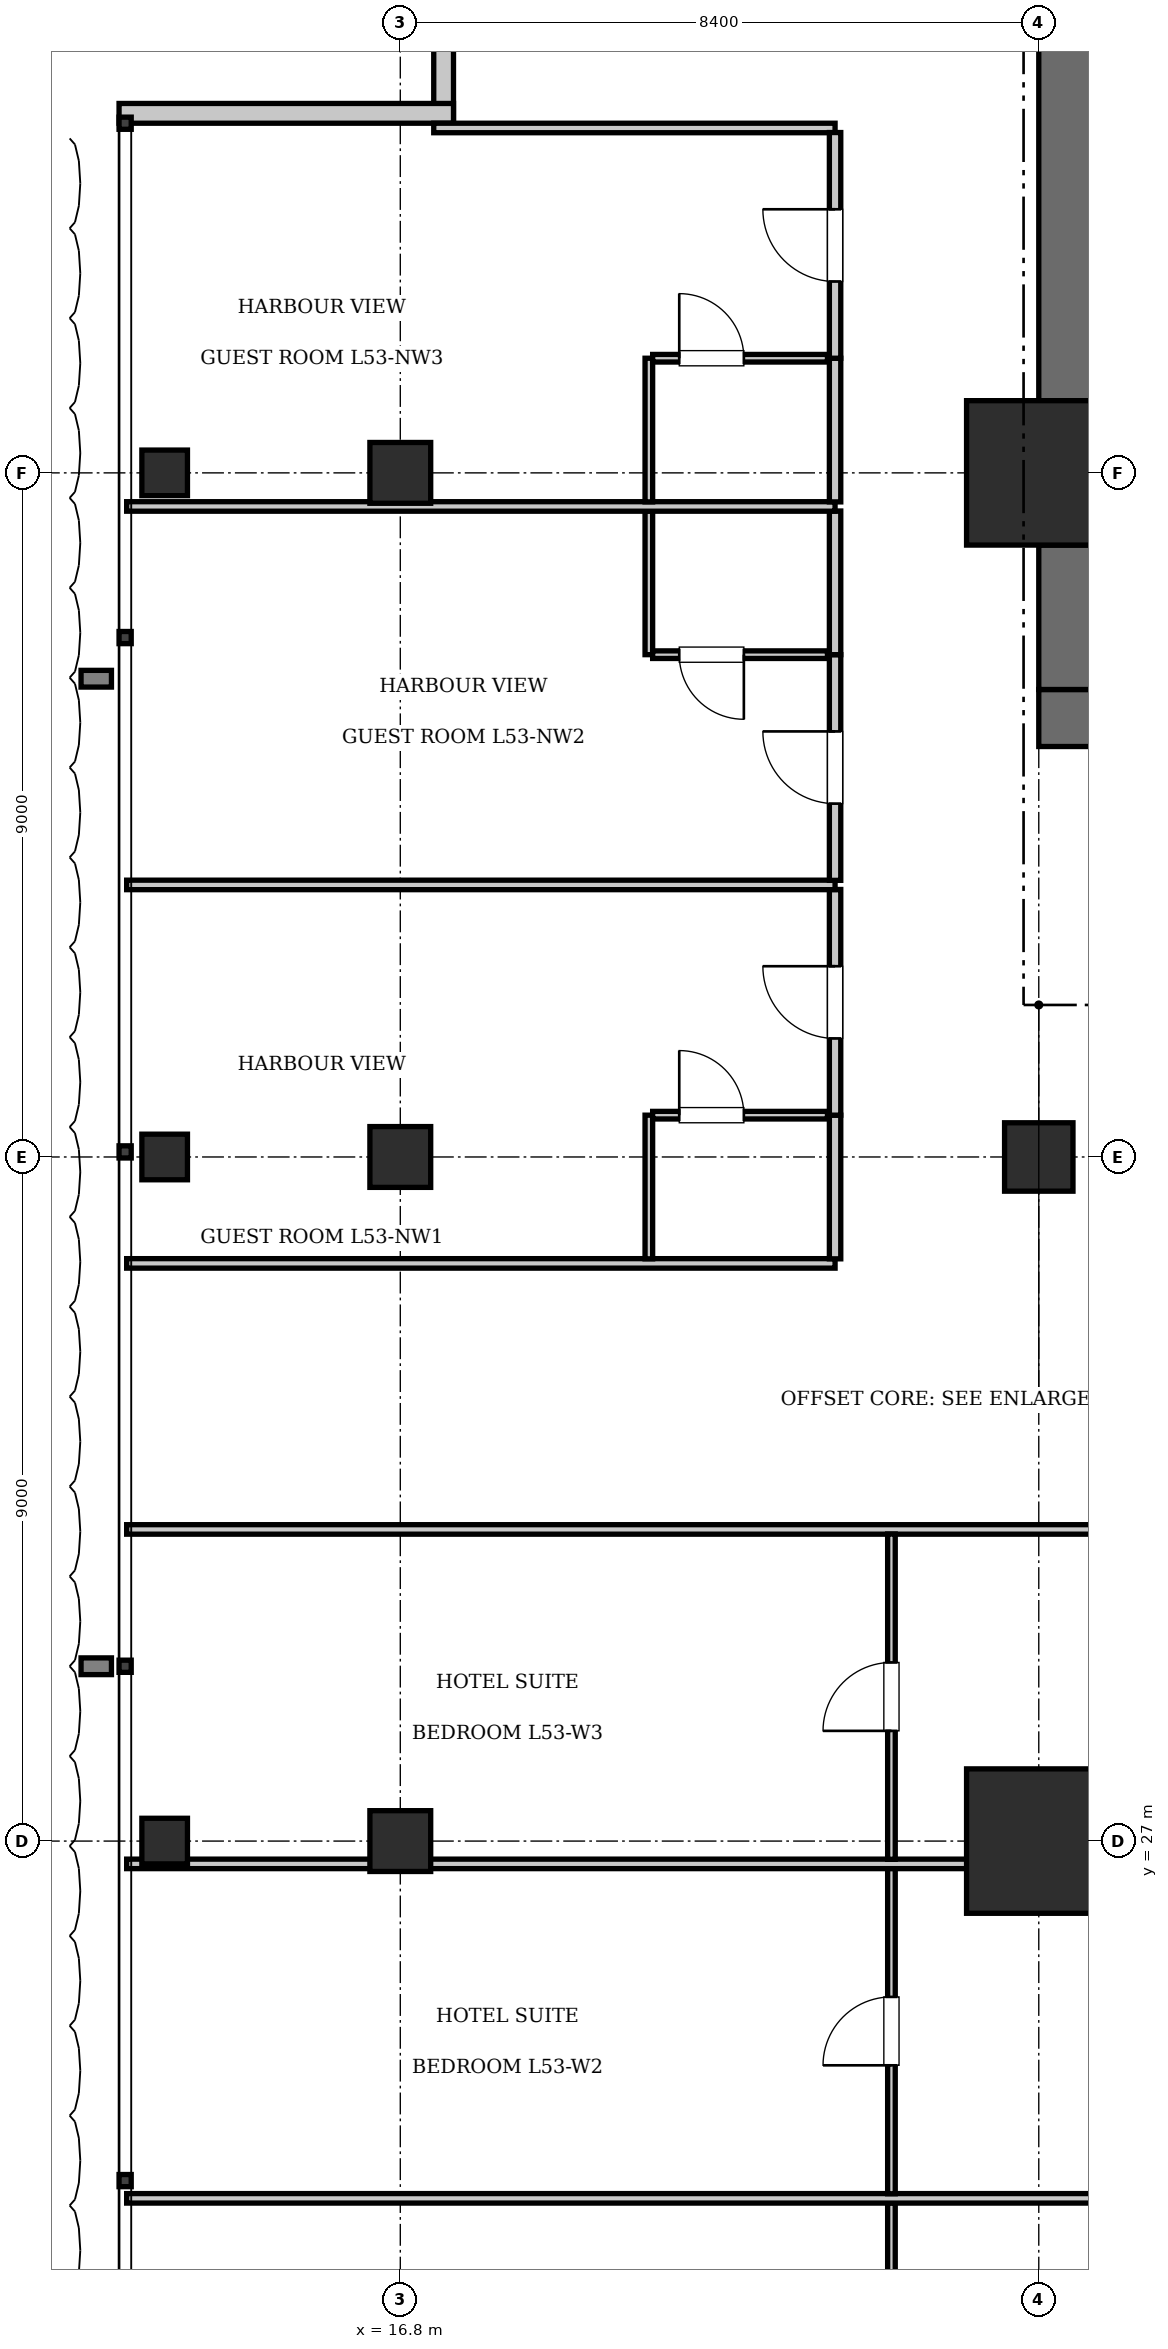
"""IFC4 building model, lengths in metres.
Left out: names, types, materials, properties, quantities, classifications, styles, units other than length and angle.
Written with IfcOpenShell. Run it as: python <this file> out.ifc"""

import sys

from ifc_helpers import new_model, si_unit, direction, frame, frame_2d, origin, origin_2d, place, context, subcontext, project, spatial, rectangle, i_section, extrude, element, fill, save


model = new_model("IFC4")
c1 = context("Model", 3, precision=1e-05, world=origin(), true_north=direction((0.0, 1.0)))
c2 = subcontext(c1, "Body", "Model", "MODEL_VIEW")
j1 = project(units=[si_unit("LENGTHUNIT", "METRE"), si_unit("PLANEANGLEUNIT", "RADIAN")], contexts=[c1])
p1 = place(None, origin())
s1 = spatial("IfcSite", under=j1, at=p1, CompositionType="ELEMENT")
p2 = place(p1, origin())
s2 = spatial("IfcBuilding", under=s1, at=p2, CompositionType="ELEMENT")
p3 = place(p2, frame((0.0, 0.0, 215.95)))
s3 = spatial("IfcBuildingStorey", under=s2, at=p3, CompositionType="ELEMENT", Elevation=215.95)
for number, where, z_axis, x_axis in (
    (1, (25.2, 27.0, 0.0), (0.0, 0.0, 1.0), (1.0, 0.0, 0.0)),
    (2, (25.2, 45.0, 0.0), (0.0, 0.0, 1.0), (1.0, 0.0, 0.0)),
):
    element("IfcColumn", number, at=place(p3, frame(where, z_axis=z_axis, x_axis=x_axis)), inside=s3, PredefinedType="COLUMN", context=c2, shape_type="SweptSolid", body=[
        extrude(rectangle(XDim=1.9, YDim=1.9, at=origin_2d()), origin(), (0.0, 0.0, 1.0), 3.85),
    ])
p4 = place(p3, frame((25.2, 41.775, 0.0), z_axis=(0.0, 0.0, 1.0), x_axis=(1.0, 0.0, 0.0)))
e3 = element("IfcWall", 3, at=p4, inside=s3, PredefinedType="SHEAR", context=c2, shape_type="SweptSolid", body=[
    extrude(rectangle(XDim=6.8, YDim=0.75, at=frame_2d((3.4, 0.0))), origin(), (0.0, 0.0, 1.0), 3.85),
])
p5 = place(p4, frame((1.65, 0.0, 0.0)))
e4 = element("IfcOpeningElement", 4, at=p5, cuts=e3, PredefinedType="OPENING", context=c2, shape_type="SweptSolid", body=[
    extrude(rectangle(XDim=1.15, YDim=2.15, at=frame_2d((0.575, 1.075))), frame((0.0, 0.385, 0.0), z_axis=(0.0, -1.0, 0.0), x_axis=(1.0, 0.0, 0.0)), (0.0, 0.0, 1.0), 0.77),
])
p6 = place(p4, frame((5.15, 0.0, 0.0)))
e5 = element("IfcOpeningElement", 5, at=p6, cuts=e3, PredefinedType="OPENING", context=c2, shape_type="SweptSolid", body=[
    extrude(rectangle(XDim=1.1, YDim=2.2, at=frame_2d((0.55, 1.1))), frame((0.0, 0.385, 0.0), z_axis=(0.0, -1.0, 0.0), x_axis=(1.0, 0.0, 0.0)), (0.0, 0.0, 1.0), 0.77),
])
p7 = place(p3, frame((25.575, 42.15, 0.0), z_axis=(0.0, 0.0, 1.0), x_axis=(0.0, 1.0, 0.0)))
e6 = element("IfcWall", 6, at=p7, inside=s3, PredefinedType="SHEAR", context=c2, shape_type="SweptSolid", body=[
    extrude(rectangle(XDim=1.9, YDim=0.75, at=frame_2d((0.95, 0.0))), origin(), (0.0, 0.0, 1.0), 3.85),
])
p8 = place(p3, frame((25.575, 45.95, 0.0), z_axis=(0.0, 0.0, 1.0), x_axis=(0.0, 1.0, 0.0)))
e7 = element("IfcWall", 7, at=p8, inside=s3, PredefinedType="SHEAR", context=c2, shape_type="SweptSolid", body=[
    extrude(rectangle(XDim=7.3, YDim=0.75, at=frame_2d((3.65, 0.0))), origin(), (0.0, 0.0, 1.0), 3.85),
])
p9 = place(p3, frame((25.2, 36.0, 0.0), z_axis=(0.0, 0.0, 1.0), x_axis=(1.0, 0.0, 0.0)))
e8 = element("IfcColumn", 8, at=p9, inside=s3, PredefinedType="COLUMN", context=c2, shape_type="SweptSolid", body=[
    extrude(rectangle(XDim=0.9, YDim=0.9, at=origin_2d()), origin(), (0.0, 0.0, 1.0), 3.85),
])
for number, where, z_axis, x_axis in (
    (9, (16.8, 27.0, 0.0), (0.0, 0.0, 1.0), (1.0, 0.0, 0.0)),
    (10, (16.8, 36.0, 0.0), (0.0, 0.0, 1.0), (1.0, 0.0, 0.0)),
    (11, (16.8, 45.0, 0.0), (0.0, 0.0, 1.0), (1.0, 0.0, 0.0)),
):
    element("IfcColumn", number, at=place(p3, frame(where, z_axis=z_axis, x_axis=x_axis)), inside=s3, PredefinedType="COLUMN", context=c2, shape_type="SweptSolid", body=[
        extrude(rectangle(XDim=0.8, YDim=0.8, at=origin_2d()), origin(), (0.0, 0.0, 1.0), 3.85),
    ])
for number, where, z_axis, x_axis in (
    (12, (13.7, 27.0, 0.0), (0.0, 0.0, 1.0), (1.0, 0.0, 0.0)),
    (13, (13.7, 36.0, 0.0), (0.0, 0.0, 1.0), (1.0, 0.0, 0.0)),
    (14, (13.7, 45.0, 0.0), (0.0, 0.0, 1.0), (1.0, 0.0, 0.0)),
):
    element("IfcColumn", number, at=place(p3, frame(where, z_axis=z_axis, x_axis=x_axis)), inside=s3, PredefinedType="COLUMN", context=c2, shape_type="SweptSolid", body=[
        extrude(i_section(OverallWidth=0.6, OverallDepth=0.6, WebThickness=0.025, FlangeThickness=0.038, at=origin_2d()), origin(), (0.0, 0.0, 1.0), 3.85),
    ])
for number, where, z_axis, x_axis in (
    (15, (17.37, 49.6, 0.0), (0.0, 0.0, 1.0), (0.0, 1.0, 0.0)),
    (16, (13.1, 49.73, 0.0), (0.0, 0.0, 1.0), (1.0, 0.0, 0.0)),
):
    element("IfcWall", number, at=place(p3, frame(where, z_axis=z_axis, x_axis=x_axis)), inside=s3, PredefinedType="SOLIDWALL", context=c2, shape_type="SweptSolid", body=[
        extrude(rectangle(XDim=4.4, YDim=0.26, at=frame_2d((2.2, 0.0))), origin(), (0.0, 0.0, 1.0), 3.61),
    ])
p10 = place(p3, frame((13.2, 31.1, 0.0), z_axis=(0.0, 0.0, 1.0), x_axis=(1.0, 0.0, 0.0)))
e17 = element("IfcWall", 17, at=p10, inside=s3, PredefinedType="PARTITIONING", context=c2, shape_type="SweptSolid", body=[
    extrude(rectangle(XDim=23.52, YDim=0.125, at=frame_2d((11.76, 0.0))), origin(), (0.0, 0.0, 1.0), 3.61),
])
p11 = place(p3, frame((23.262, 17.96, 0.0), z_axis=(0.0, 0.0, 1.0), x_axis=(0.0, 1.0, 0.0)))
e18 = element("IfcWall", 18, at=p11, inside=s3, PredefinedType="PARTITIONING", context=c2, shape_type="SweptSolid", body=[
    extrude(rectangle(XDim=4.28, YDim=0.1, at=frame_2d((2.14, 0.0))), origin(), (0.0, 0.0, 1.0), 3.61),
])
p12 = place(p11, frame((1.69, 0.0, 0.0)))
e19 = element("IfcOpeningElement", 19, at=p12, cuts=e18, PredefinedType="OPENING", context=c2, shape_type="SweptSolid", body=[
    extrude(rectangle(XDim=0.9, YDim=2.1, at=frame_2d((0.45, 1.05))), frame((0.0, 0.06, 0.0), z_axis=(0.0, -1.0, 0.0), x_axis=(1.0, 0.0, 0.0)), (0.0, 0.0, 1.0), 0.12),
])
p13 = place(p3, frame((13.2, 22.3, 0.0), z_axis=(0.0, 0.0, 1.0), x_axis=(1.0, 0.0, 0.0)))
e20 = element("IfcWall", 20, at=p13, inside=s3, PredefinedType="PARTITIONING", context=c2, shape_type="SweptSolid", body=[
    extrude(rectangle(XDim=23.52, YDim=0.125, at=frame_2d((11.76, 0.0))), origin(), (0.0, 0.0, 1.0), 3.61),
])
p14 = place(p3, frame((23.262, 22.36, 0.0), z_axis=(0.0, 0.0, 1.0), x_axis=(0.0, 1.0, 0.0)))
e21 = element("IfcWall", 21, at=p14, inside=s3, PredefinedType="PARTITIONING", context=c2, shape_type="SweptSolid", body=[
    extrude(rectangle(XDim=4.28, YDim=0.1, at=frame_2d((2.14, 0.0))), origin(), (0.0, 0.0, 1.0), 3.61),
])
p15 = place(p14, frame((1.69, 0.0, 0.0)))
e22 = element("IfcOpeningElement", 22, at=p15, cuts=e21, PredefinedType="OPENING", context=c2, shape_type="SweptSolid", body=[
    extrude(rectangle(XDim=0.9, YDim=2.1, at=frame_2d((0.45, 1.05))), frame((0.0, 0.06, 0.0), z_axis=(0.0, -1.0, 0.0), x_axis=(1.0, 0.0, 0.0)), (0.0, 0.0, 1.0), 0.12),
])
p16 = place(p3, frame((13.2, 26.7, 0.0), z_axis=(0.0, 0.0, 1.0), x_axis=(1.0, 0.0, 0.0)))
e23 = element("IfcWall", 23, at=p16, inside=s3, PredefinedType="PARTITIONING", context=c2, shape_type="SweptSolid", body=[
    extrude(rectangle(XDim=23.52, YDim=0.125, at=frame_2d((11.76, 0.0))), origin(), (0.0, 0.0, 1.0), 3.61),
])
p17 = place(p3, frame((23.262, 26.76, 0.0), z_axis=(0.0, 0.0, 1.0), x_axis=(0.0, 1.0, 0.0)))
e24 = element("IfcWall", 24, at=p17, inside=s3, PredefinedType="PARTITIONING", context=c2, shape_type="SweptSolid", body=[
    extrude(rectangle(XDim=4.28, YDim=0.1, at=frame_2d((2.14, 0.0))), origin(), (0.0, 0.0, 1.0), 3.61),
])
p18 = place(p17, frame((1.69, 0.0, 0.0)))
e25 = element("IfcOpeningElement", 25, at=p18, cuts=e24, PredefinedType="OPENING", context=c2, shape_type="SweptSolid", body=[
    extrude(rectangle(XDim=0.9, YDim=2.1, at=frame_2d((0.45, 1.05))), frame((0.0, 0.06, 0.0), z_axis=(0.0, -1.0, 0.0), x_axis=(1.0, 0.0, 0.0)), (0.0, 0.0, 1.0), 0.12),
])
p19 = place(p3, frame((13.2, 34.6, 0.0), z_axis=(0.0, 0.0, 1.0), x_axis=(1.0, 0.0, 0.0)))
e26 = element("IfcWall", 26, at=p19, inside=s3, PredefinedType="PARTITIONING", context=c2, shape_type="SweptSolid", body=[
    extrude(rectangle(XDim=9.32, YDim=0.125, at=frame_2d((4.66, 0.0))), origin(), (0.0, 0.0, 1.0), 3.61),
])
p20 = place(p3, frame((17.24, 49.538, 0.0), z_axis=(0.0, 0.0, 1.0), x_axis=(1.0, 0.0, 0.0)))
e27 = element("IfcWall", 27, at=p20, inside=s3, PredefinedType="PARTITIONING", context=c2, shape_type="SweptSolid", body=[
    extrude(rectangle(XDim=5.28, YDim=0.125, at=frame_2d((2.64, 0.0))), origin(), (0.0, 0.0, 1.0), 3.61),
])
p21 = place(p3, frame((22.52, 34.66, 0.0), z_axis=(0.0, 0.0, 1.0), x_axis=(0.0, 1.0, 0.0)))
e28 = element("IfcWall", 28, at=p21, inside=s3, PredefinedType="PARTITIONING", context=c2, shape_type="SweptSolid", body=[
    extrude(rectangle(XDim=1.89, YDim=0.15, at=frame_2d((0.945, 0.0))), origin(), (0.0, 0.0, 1.0), 3.61),
])
p22 = place(p3, frame((22.52, 36.55, 0.0), z_axis=(0.0, 0.0, 1.0), x_axis=(0.0, 1.0, 0.0)))
e29 = element("IfcWall", 29, at=p22, inside=s3, PredefinedType="PARTITIONING", context=c2, shape_type="SweptSolid", body=[
    extrude(rectangle(XDim=2.969, YDim=0.15, at=frame_2d((1.485, 0.0))), origin(), (0.0, 0.0, 1.0), 3.61),
])
p23 = place(p22, frame((1.01, 0.0, 0.0)))
e30 = element("IfcOpeningElement", 30, at=p23, cuts=e29, PredefinedType="OPENING", context=c2, shape_type="SweptSolid", body=[
    extrude(rectangle(XDim=0.95, YDim=2.15, at=frame_2d((0.475, 1.075))), frame((0.0, 0.085, 0.0), z_axis=(0.0, -1.0, 0.0), x_axis=(1.0, 0.0, 0.0)), (0.0, 0.0, 1.0), 0.17),
])
p24 = place(p3, frame((20.07, 34.66, 0.0), z_axis=(0.0, 0.0, 1.0), x_axis=(0.0, 1.0, 0.0)))
e31 = element("IfcWall", 31, at=p24, inside=s3, PredefinedType="PARTITIONING", context=c2, shape_type="SweptSolid", body=[
    extrude(rectangle(XDim=1.89, YDim=0.1, at=frame_2d((0.945, 0.0))), origin(), (0.0, 0.0, 1.0), 3.61),
])
p25 = place(p3, frame((20.12, 36.55, 0.0), z_axis=(0.0, 0.0, 1.0), x_axis=(1.0, 0.0, 0.0)))
e32 = element("IfcWall", 32, at=p25, inside=s3, PredefinedType="PARTITIONING", context=c2, shape_type="SweptSolid", body=[
    extrude(rectangle(XDim=2.3, YDim=0.1, at=frame_2d((1.15, 0.0))), origin(), (0.0, 0.0, 1.0), 3.61),
])
p26 = place(p25, frame((0.35, 0.0, 0.0)))
e33 = element("IfcOpeningElement", 33, at=p26, cuts=e32, PredefinedType="OPENING", context=c2, shape_type="SweptSolid", body=[
    extrude(rectangle(XDim=0.85, YDim=2.1, at=frame_2d((0.425, 1.05))), frame((0.0, 0.06, 0.0), z_axis=(0.0, -1.0, 0.0), x_axis=(1.0, 0.0, 0.0)), (0.0, 0.0, 1.0), 0.12),
])
p27 = place(p3, frame((13.2, 39.579, 0.0), z_axis=(0.0, 0.0, 1.0), x_axis=(1.0, 0.0, 0.0)))
e34 = element("IfcWall", 34, at=p27, inside=s3, PredefinedType="PARTITIONING", context=c2, shape_type="SweptSolid", body=[
    extrude(rectangle(XDim=9.32, YDim=0.125, at=frame_2d((4.66, 0.0))), origin(), (0.0, 0.0, 1.0), 3.61),
])
p28 = place(p3, frame((22.52, 39.639, 0.0), z_axis=(0.0, 0.0, 1.0), x_axis=(0.0, 1.0, 0.0)))
e35 = element("IfcWall", 35, at=p28, inside=s3, PredefinedType="PARTITIONING", context=c2, shape_type="SweptSolid", body=[
    extrude(rectangle(XDim=2.969, YDim=0.15, at=frame_2d((1.485, 0.0))), origin(), (0.0, 0.0, 1.0), 3.61),
])
p29 = place(p28, frame((1.01, 0.0, 0.0)))
e36 = element("IfcOpeningElement", 36, at=p29, cuts=e35, PredefinedType="OPENING", context=c2, shape_type="SweptSolid", body=[
    extrude(rectangle(XDim=0.95, YDim=2.15, at=frame_2d((0.475, 1.075))), frame((0.0, 0.085, 0.0), z_axis=(0.0, -1.0, 0.0), x_axis=(1.0, 0.0, 0.0)), (0.0, 0.0, 1.0), 0.17),
])
p30 = place(p3, frame((22.52, 42.608, 0.0), z_axis=(0.0, 0.0, 1.0), x_axis=(0.0, 1.0, 0.0)))
e37 = element("IfcWall", 37, at=p30, inside=s3, PredefinedType="PARTITIONING", context=c2, shape_type="SweptSolid", body=[
    extrude(rectangle(XDim=1.89, YDim=0.15, at=frame_2d((0.945, 0.0))), origin(), (0.0, 0.0, 1.0), 3.61),
])
p31 = place(p3, frame((20.07, 42.608, 0.0), z_axis=(0.0, 0.0, 1.0), x_axis=(0.0, 1.0, 0.0)))
e38 = element("IfcWall", 38, at=p31, inside=s3, PredefinedType="PARTITIONING", context=c2, shape_type="SweptSolid", body=[
    extrude(rectangle(XDim=1.89, YDim=0.1, at=frame_2d((0.945, 0.0))), origin(), (0.0, 0.0, 1.0), 3.61),
])
p32 = place(p3, frame((20.12, 42.608, 0.0), z_axis=(0.0, 0.0, 1.0), x_axis=(1.0, 0.0, 0.0)))
e39 = element("IfcWall", 39, at=p32, inside=s3, PredefinedType="PARTITIONING", context=c2, shape_type="SweptSolid", body=[
    extrude(rectangle(XDim=2.3, YDim=0.1, at=frame_2d((1.15, 0.0))), origin(), (0.0, 0.0, 1.0), 3.61),
])
p33 = place(p32, frame((0.35, 0.0, 0.0)))
e40 = element("IfcOpeningElement", 40, at=p33, cuts=e39, PredefinedType="OPENING", context=c2, shape_type="SweptSolid", body=[
    extrude(rectangle(XDim=0.85, YDim=2.1, at=frame_2d((0.425, 1.05))), frame((0.0, 0.06, 0.0), z_axis=(0.0, -1.0, 0.0), x_axis=(1.0, 0.0, 0.0)), (0.0, 0.0, 1.0), 0.12),
])
p34 = place(p3, frame((13.2, 44.558, 0.0), z_axis=(0.0, 0.0, 1.0), x_axis=(1.0, 0.0, 0.0)))
e41 = element("IfcWall", 41, at=p34, inside=s3, PredefinedType="PARTITIONING", context=c2, shape_type="SweptSolid", body=[
    extrude(rectangle(XDim=9.32, YDim=0.125, at=frame_2d((4.66, 0.0))), origin(), (0.0, 0.0, 1.0), 3.61),
])
p35 = place(p3, frame((22.52, 44.618, 0.0), z_axis=(0.0, 0.0, 1.0), x_axis=(0.0, 1.0, 0.0)))
e42 = element("IfcWall", 42, at=p35, inside=s3, PredefinedType="PARTITIONING", context=c2, shape_type="SweptSolid", body=[
    extrude(rectangle(XDim=1.89, YDim=0.15, at=frame_2d((0.945, 0.0))), origin(), (0.0, 0.0, 1.0), 3.61),
])
p36 = place(p3, frame((22.52, 46.508, 0.0), z_axis=(0.0, 0.0, 1.0), x_axis=(0.0, 1.0, 0.0)))
e43 = element("IfcWall", 43, at=p36, inside=s3, PredefinedType="PARTITIONING", context=c2, shape_type="SweptSolid", body=[
    extrude(rectangle(XDim=2.969, YDim=0.15, at=frame_2d((1.485, 0.0))), origin(), (0.0, 0.0, 1.0), 3.61),
])
p37 = place(p36, frame((1.01, 0.0, 0.0)))
e44 = element("IfcOpeningElement", 44, at=p37, cuts=e43, PredefinedType="OPENING", context=c2, shape_type="SweptSolid", body=[
    extrude(rectangle(XDim=0.95, YDim=2.15, at=frame_2d((0.475, 1.075))), frame((0.0, 0.085, 0.0), z_axis=(0.0, -1.0, 0.0), x_axis=(1.0, 0.0, 0.0)), (0.0, 0.0, 1.0), 0.17),
])
p38 = place(p3, frame((20.07, 44.618, 0.0), z_axis=(0.0, 0.0, 1.0), x_axis=(0.0, 1.0, 0.0)))
e45 = element("IfcWall", 45, at=p38, inside=s3, PredefinedType="PARTITIONING", context=c2, shape_type="SweptSolid", body=[
    extrude(rectangle(XDim=1.89, YDim=0.1, at=frame_2d((0.945, 0.0))), origin(), (0.0, 0.0, 1.0), 3.61),
])
p39 = place(p3, frame((20.12, 46.508, 0.0), z_axis=(0.0, 0.0, 1.0), x_axis=(1.0, 0.0, 0.0)))
e46 = element("IfcWall", 46, at=p39, inside=s3, PredefinedType="PARTITIONING", context=c2, shape_type="SweptSolid", body=[
    extrude(rectangle(XDim=2.3, YDim=0.1, at=frame_2d((1.15, 0.0))), origin(), (0.0, 0.0, 1.0), 3.61),
])
p40 = place(p39, frame((0.35, 0.0, 0.0)))
e47 = element("IfcOpeningElement", 47, at=p40, cuts=e46, PredefinedType="OPENING", context=c2, shape_type="SweptSolid", body=[
    extrude(rectangle(XDim=0.85, YDim=2.1, at=frame_2d((0.425, 1.05))), frame((0.0, 0.06, 0.0), z_axis=(0.0, -1.0, 0.0), x_axis=(1.0, 0.0, 0.0)), (0.0, 0.0, 1.0), 0.12),
])
p41 = place(p15, origin())
e48 = element("IfcDoor", 48, at=p41, inside=s3, OperationType="SINGLE_SWING_LEFT", PredefinedType="DOOR", context=c2, shape_type="SweptSolid", body=[
    extrude(rectangle(XDim=0.9, YDim=2.1, at=frame_2d((0.45, 1.05))), frame((0.0, 0.025, 0.0), z_axis=(0.0, -1.0, 0.0), x_axis=(1.0, 0.0, 0.0)), (0.0, 0.0, 1.0), 0.05),
])
fill(e22, e48)
p42 = place(p18, origin())
e49 = element("IfcDoor", 49, at=p42, inside=s3, OperationType="SINGLE_SWING_LEFT", PredefinedType="DOOR", context=c2, shape_type="SweptSolid", body=[
    extrude(rectangle(XDim=0.9, YDim=2.1, at=frame_2d((0.45, 1.05))), frame((0.0, 0.025, 0.0), z_axis=(0.0, -1.0, 0.0), x_axis=(1.0, 0.0, 0.0)), (0.0, 0.0, 1.0), 0.05),
])
fill(e25, e49)
p43 = place(p26, origin())
e50 = element("IfcDoor", 50, at=p43, inside=s3, OperationType="SINGLE_SWING_LEFT", PredefinedType="DOOR", context=c2, shape_type="SweptSolid", body=[
    extrude(rectangle(XDim=0.85, YDim=2.1, at=frame_2d((0.425, 1.05))), frame((0.0, 0.025, 0.0), z_axis=(0.0, -1.0, 0.0), x_axis=(1.0, 0.0, 0.0)), (0.0, 0.0, 1.0), 0.05),
])
fill(e33, e50)
p44 = place(p23, origin())
e51 = element("IfcDoor", 51, at=p44, inside=s3, OperationType="SINGLE_SWING_RIGHT", PredefinedType="DOOR", context=c2, shape_type="SweptSolid", body=[
    extrude(rectangle(XDim=0.95, YDim=2.15, at=frame_2d((0.475, 1.075))), frame((0.0, 0.025, 0.0), z_axis=(0.0, -1.0, 0.0), x_axis=(1.0, 0.0, 0.0)), (0.0, 0.0, 1.0), 0.05),
])
fill(e30, e51)
p45 = place(p33, frame((0.85, 0.0, 0.0), z_axis=(0.0, 0.0, 1.0), x_axis=(-1.0, 0.0, 0.0)))
e52 = element("IfcDoor", 52, at=p45, inside=s3, OperationType="SINGLE_SWING_LEFT", PredefinedType="DOOR", context=c2, shape_type="SweptSolid", body=[
    extrude(rectangle(XDim=0.85, YDim=2.1, at=frame_2d((0.425, 1.05))), frame((0.0, 0.025, 0.0), z_axis=(0.0, -1.0, 0.0), x_axis=(1.0, 0.0, 0.0)), (0.0, 0.0, 1.0), 0.05),
])
fill(e40, e52)
p46 = place(p29, origin())
e53 = element("IfcDoor", 53, at=p46, inside=s3, OperationType="SINGLE_SWING_RIGHT", PredefinedType="DOOR", context=c2, shape_type="SweptSolid", body=[
    extrude(rectangle(XDim=0.95, YDim=2.15, at=frame_2d((0.475, 1.075))), frame((0.0, 0.025, 0.0), z_axis=(0.0, -1.0, 0.0), x_axis=(1.0, 0.0, 0.0)), (0.0, 0.0, 1.0), 0.05),
])
fill(e36, e53)
p47 = place(p40, origin())
e54 = element("IfcDoor", 54, at=p47, inside=s3, OperationType="SINGLE_SWING_LEFT", PredefinedType="DOOR", context=c2, shape_type="SweptSolid", body=[
    extrude(rectangle(XDim=0.85, YDim=2.1, at=frame_2d((0.425, 1.05))), frame((0.0, 0.025, 0.0), z_axis=(0.0, -1.0, 0.0), x_axis=(1.0, 0.0, 0.0)), (0.0, 0.0, 1.0), 0.05),
])
fill(e47, e54)
p48 = place(p37, origin())
e55 = element("IfcDoor", 55, at=p48, inside=s3, OperationType="SINGLE_SWING_RIGHT", PredefinedType="DOOR", context=c2, shape_type="SweptSolid", body=[
    extrude(rectangle(XDim=0.95, YDim=2.15, at=frame_2d((0.475, 1.075))), frame((0.0, 0.025, 0.0), z_axis=(0.0, -1.0, 0.0), x_axis=(1.0, 0.0, 0.0)), (0.0, 0.0, 1.0), 0.05),
])
fill(e44, e55)
save(model, sys.argv[1])
